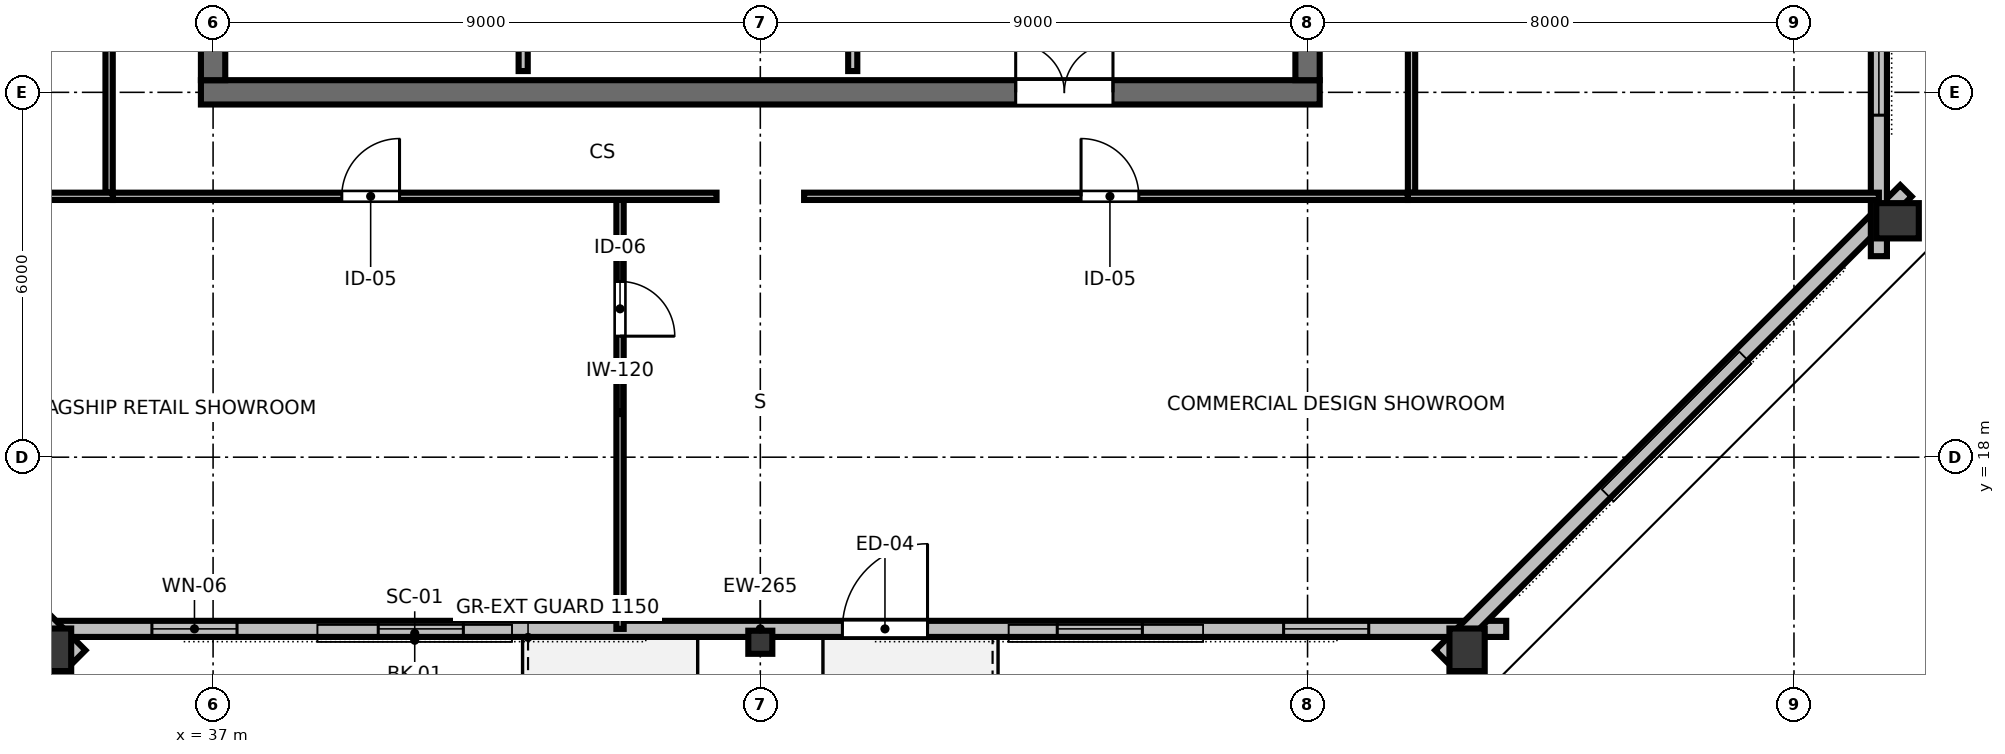
"""IFC4 building model, lengths in metres.
Left out: names, types, materials, properties, quantities, classifications, styles, units other than length and angle.
Written with IfcOpenShell. Run it as: python <this file> out.ifc"""

import sys

from ifc_helpers import new_model, si_unit, direction, frame, frame_2d, origin, origin_2d, place, context, subcontext, project, spatial, rectangle, hollow_rectangle, i_section, extrude, element, fill, save


model = new_model("IFC4")
c1 = context("Model", 3, precision=1e-05, world=origin(), true_north=direction((0.0, 1.0)))
c2 = subcontext(c1, "Body", "Model", "MODEL_VIEW")
j1 = project(units=[si_unit("LENGTHUNIT", "METRE"), si_unit("PLANEANGLEUNIT", "RADIAN")], contexts=[c1])
p1 = place(None, origin())
s1 = spatial("IfcSite", under=j1, at=p1, CompositionType="ELEMENT")
p2 = place(p1, origin())
s2 = spatial("IfcBuilding", under=s1, at=p2, CompositionType="ELEMENT")
p3 = place(p2, frame((0.0, 0.0, 253.8)))
s3 = spatial("IfcBuildingStorey", under=s2, at=p3, CompositionType="ELEMENT", Elevation=253.8)
p4 = place(p3, frame((36.8, 24.0, 0.0), z_axis=(0.0, 0.0, 1.0), x_axis=(1.0, 0.0, 0.0)))
e1 = element("IfcWall", 1, at=p4, inside=s3, PredefinedType="SHEAR", context=c2, shape_type="SweptSolid", body=[
    extrude(rectangle(XDim=18.4, YDim=0.4, at=frame_2d((9.2, 0.0))), origin(), (0.0, 0.0, 1.0), 3.36),
])
p5 = place(p4, frame((13.4, 0.0, 0.0)))
e2 = element("IfcOpeningElement", 2, at=p5, cuts=e1, PredefinedType="OPENING", context=c2, shape_type="SweptSolid", body=[
    extrude(rectangle(XDim=1.6, YDim=2.15, at=frame_2d((0.8, 1.075))), frame((0.0, 0.21, 0.0), z_axis=(0.0, -1.0, 0.0), x_axis=(1.0, 0.0, 0.0)), (0.0, 0.0, 1.0), 0.42),
])
p6 = place(p3, frame((37.0, 24.2, 0.0), z_axis=(0.0, 0.0, 1.0), x_axis=(0.0, 1.0, 0.0)))
e3 = element("IfcWall", 3, at=p6, inside=s3, PredefinedType="SHEAR", context=c2, shape_type="SweptSolid", body=[
    extrude(rectangle(XDim=15.6, YDim=0.4, at=frame_2d((7.8, 0.0))), origin(), (0.0, 0.0, 1.0), 3.36),
])
p7 = place(p6, frame((5.325, 0.0, 0.0)))
e4 = element("IfcOpeningElement", 4, at=p7, cuts=e3, PredefinedType="OPENING", context=c2, shape_type="SweptSolid", body=[
    extrude(rectangle(XDim=1.15, YDim=2.15, at=frame_2d((0.575, 1.075))), frame((0.0, 0.21, 0.0), z_axis=(0.0, -1.0, 0.0), x_axis=(1.0, 0.0, 0.0)), (0.0, 0.0, 1.0), 0.42),
])
p8 = place(p3, frame((55.0, 24.2, 0.0), z_axis=(0.0, 0.0, 1.0), x_axis=(0.0, 1.0, 0.0)))
e5 = element("IfcWall", 5, at=p8, inside=s3, PredefinedType="SHEAR", context=c2, shape_type="SweptSolid", body=[
    extrude(rectangle(XDim=15.6, YDim=0.4, at=frame_2d((7.8, 0.0))), origin(), (0.0, 0.0, 1.0), 3.36),
])
p9 = place(p8, frame((5.325, 0.0, 0.0)))
e6 = element("IfcOpeningElement", 6, at=p9, cuts=e5, PredefinedType="OPENING", context=c2, shape_type="SweptSolid", body=[
    extrude(rectangle(XDim=1.15, YDim=2.15, at=frame_2d((0.575, 1.075))), frame((0.0, 0.21, 0.0), z_axis=(0.0, -1.0, 0.0), x_axis=(1.0, 0.0, 0.0)), (0.0, 0.0, 1.0), 0.42),
])
p10 = place(p3, frame((34.376, 14.833, 0.0), z_axis=(0.0, 0.0, 1.0), x_axis=(1.0, 0.0, 0.0)))
e7 = element("IfcColumn", 7, at=p10, inside=s3, PredefinedType="COLUMN", context=c2, shape_type="SweptSolid", body=[
    extrude(hollow_rectangle(XDim=0.58, YDim=0.7, WallThickness=0.032, at=origin_2d()), origin(), (0.0, 0.0, 1.0), 3.373),
])
p11 = place(p3, frame((46.0, 14.956, 0.0), z_axis=(0.0, 0.0, 1.0), x_axis=(1.0, 0.0, 0.0)))
e8 = element("IfcColumn", 8, at=p11, inside=s3, PredefinedType="COLUMN", context=c2, shape_type="SweptSolid", body=[
    extrude(i_section(OverallWidth=0.395, OverallDepth=0.38, WebThickness=0.019, FlangeThickness=0.03, FilletRadius=0.025, at=origin_2d()), origin(), (0.0, 0.0, 1.0), 3.373),
])
for number, where, z_axis, x_axis in (
    (9, (57.624, 14.833, 0.0), (0.0, 0.0, 1.0), (1.0, 0.0, 0.0)),
    (10, (64.703, 21.888, 0.0), (0.0, 0.0, 1.0), (0.0, 1.0, 0.0)),
):
    element("IfcColumn", number, at=place(p3, frame(where, z_axis=z_axis, x_axis=x_axis)), inside=s3, PredefinedType="COLUMN", context=c2, shape_type="SweptSolid", body=[
        extrude(hollow_rectangle(XDim=0.58, YDim=0.7, WallThickness=0.032, at=origin_2d()), origin(), (0.0, 0.0, 1.0), 3.373),
    ])
p12 = place(p3, frame((33.733, 15.177, 0.0), z_axis=(0.0, 0.0, 1.0), x_axis=(1.0, 0.0, 0.0)))
e11 = element("IfcWall", 11, at=p12, inside=s3, PredefinedType="STANDARD", context=c2, shape_type="SweptSolid", body=[
    extrude(rectangle(XDim=24.535, YDim=0.265, at=frame_2d((12.267, 0.0))), origin(), (0.0, 0.0, 1.0), 2.832),
])
p13 = place(p12, frame((13.617, 0.0, 0.0)))
e12 = element("IfcOpeningElement", 12, at=p13, cuts=e11, PredefinedType="OPENING", context=c2, shape_type="SweptSolid", body=[
    extrude(rectangle(XDim=1.4, YDim=2.15, at=frame_2d((0.7, 1.075))), frame((0.0, 0.142, 0.0), z_axis=(0.0, -1.0, 0.0), x_axis=(1.0, 0.0, 0.0)), (0.0, 0.0, 1.0), 0.285),
])
p14 = place(p12, frame((2.261, 0.0, 0.85)))
e13 = element("IfcOpeningElement", 13, at=p14, cuts=e11, PredefinedType="OPENING", context=c2, shape_type="SweptSolid", body=[
    extrude(rectangle(XDim=1.4, YDim=1.2, at=frame_2d((0.7, 0.6))), frame((0.0, 0.142, 0.0), z_axis=(0.0, -1.0, 0.0), x_axis=(1.0, 0.0, 0.0)), (0.0, 0.0, 1.0), 0.285),
])
p15 = place(p12, frame((5.984, 0.0, 0.85)))
e14 = element("IfcOpeningElement", 14, at=p15, cuts=e11, PredefinedType="OPENING", context=c2, shape_type="SweptSolid", body=[
    extrude(rectangle(XDim=1.4, YDim=1.2, at=frame_2d((0.7, 0.6))), frame((0.0, 0.142, 0.0), z_axis=(0.0, -1.0, 0.0), x_axis=(1.0, 0.0, 0.0)), (0.0, 0.0, 1.0), 0.285),
])
p16 = place(p12, frame((17.151, 0.0, 0.85)))
e15 = element("IfcOpeningElement", 15, at=p16, cuts=e11, PredefinedType="OPENING", context=c2, shape_type="SweptSolid", body=[
    extrude(rectangle(XDim=1.4, YDim=1.2, at=frame_2d((0.7, 0.6))), frame((0.0, 0.142, 0.0), z_axis=(0.0, -1.0, 0.0), x_axis=(1.0, 0.0, 0.0)), (0.0, 0.0, 1.0), 0.285),
])
p17 = place(p12, frame((20.873, 0.0, 0.85)))
e16 = element("IfcOpeningElement", 16, at=p17, cuts=e11, PredefinedType="OPENING", context=c2, shape_type="SweptSolid", body=[
    extrude(rectangle(XDim=1.4, YDim=1.2, at=frame_2d((0.7, 0.6))), frame((0.0, 0.142, 0.0), z_axis=(0.0, -1.0, 0.0), x_axis=(1.0, 0.0, 0.0)), (0.0, 0.0, 1.0), 0.285),
])
p18 = place(p3, frame((57.193, 14.731, 0.0), z_axis=(0.0, 0.0, 1.0), x_axis=(0.707106781187, 0.707106781187, 0.0)))
e17 = element("IfcWall", 17, at=p18, inside=s3, PredefinedType="STANDARD", context=c2, shape_type="SweptSolid", body=[
    extrude(rectangle(XDim=10.816, YDim=0.265, at=frame_2d((5.408, 0.0))), origin(), (0.0, 0.0, 1.0), 2.832),
])
p19 = place(p3, frame((64.396, 21.305, 0.0), z_axis=(0.0, 0.0, 1.0), x_axis=(0.0, 1.0, 0.0)))
e18 = element("IfcWall", 18, at=p19, inside=s3, PredefinedType="STANDARD", context=c2, shape_type="SweptSolid", body=[
    extrude(rectangle(XDim=21.389, YDim=0.265, at=frame_2d((10.695, 0.0))), origin(), (0.0, 0.0, 1.0), 2.832),
])
p20 = place(p19, frame((2.319, 0.0, 0.85)))
e19 = element("IfcOpeningElement", 19, at=p20, cuts=e18, PredefinedType="OPENING", context=c2, shape_type="SweptSolid", body=[
    extrude(rectangle(XDim=1.4, YDim=1.2, at=frame_2d((0.7, 0.6))), frame((0.0, 0.142, 0.0), z_axis=(0.0, -1.0, 0.0), x_axis=(1.0, 0.0, 0.0)), (0.0, 0.0, 1.0), 0.285),
])
p21 = place(p19, frame((6.157, 0.0, 0.85)))
e20 = element("IfcOpeningElement", 20, at=p21, cuts=e18, PredefinedType="OPENING", context=c2, shape_type="SweptSolid", body=[
    extrude(rectangle(XDim=1.4, YDim=1.2, at=frame_2d((0.7, 0.6))), frame((0.0, 0.142, 0.0), z_axis=(0.0, -1.0, 0.0), x_axis=(1.0, 0.0, 0.0)), (0.0, 0.0, 1.0), 0.285),
])
p22 = place(p19, frame((13.832, 0.0, 0.85)))
e21 = element("IfcOpeningElement", 21, at=p22, cuts=e18, PredefinedType="OPENING", context=c2, shape_type="SweptSolid", body=[
    extrude(rectangle(XDim=1.4, YDim=1.2, at=frame_2d((0.7, 0.6))), frame((0.0, 0.142, 0.0), z_axis=(0.0, -1.0, 0.0), x_axis=(1.0, 0.0, 0.0)), (0.0, 0.0, 1.0), 0.285),
])
p23 = place(p19, frame((17.67, 0.0, 0.85)))
e22 = element("IfcOpeningElement", 22, at=p23, cuts=e18, PredefinedType="OPENING", context=c2, shape_type="SweptSolid", body=[
    extrude(rectangle(XDim=1.4, YDim=1.2, at=frame_2d((0.7, 0.6))), frame((0.0, 0.142, 0.0), z_axis=(0.0, -1.0, 0.0), x_axis=(1.0, 0.0, 0.0)), (0.0, 0.0, 1.0), 0.285),
])
p24 = place(p3, frame((27.159, 22.38, 0.0), z_axis=(0.0, 0.0, 1.0), x_axis=(0.707106781187, -0.707106781187, 0.0)))
e23 = element("IfcWall", 23, at=p24, inside=s3, PredefinedType="STANDARD", context=c2, shape_type="SweptSolid", body=[
    extrude(rectangle(XDim=10.816, YDim=0.265, at=frame_2d((5.408, 0.0))), origin(), (0.0, 0.0, 1.0), 2.832),
])
p25 = place(p3, frame((42.1, 24.35, 0.0), z_axis=(0.0, 0.0, 1.0), x_axis=(0.0, 1.0, 0.0)))
e24 = element("IfcWall", 24, at=p25, inside=s3, PredefinedType="PARTITIONING", context=c2, shape_type="SweptSolid", body=[
    extrude(rectangle(XDim=3.9, YDim=0.15, at=frame_2d((1.95, 0.0))), origin(), (0.0, 0.0, 1.0), 3.375),
])
p26 = place(p25, frame((1.5, 0.0, 0.0)))
e25 = element("IfcOpeningElement", 25, at=p26, cuts=e24, PredefinedType="OPENING", context=c2, shape_type="SweptSolid", body=[
    extrude(rectangle(XDim=0.9, YDim=2.15, at=frame_2d((0.45, 1.075))), frame((0.0, 0.085, 0.0), z_axis=(0.0, -1.0, 0.0), x_axis=(1.0, 0.0, 0.0)), (0.0, 0.0, 1.0), 0.17),
])
p27 = place(p3, frame((47.52, 24.35, 0.0), z_axis=(0.0, 0.0, 1.0), x_axis=(0.0, 1.0, 0.0)))
e26 = element("IfcWall", 26, at=p27, inside=s3, PredefinedType="PARTITIONING", context=c2, shape_type="SweptSolid", body=[
    extrude(rectangle(XDim=3.9, YDim=0.15, at=frame_2d((1.95, 0.0))), origin(), (0.0, 0.0, 1.0), 3.375),
])
p28 = place(p27, frame((0.35, 0.0, 0.0)))
e27 = element("IfcOpeningElement", 27, at=p28, cuts=e26, PredefinedType="OPENING", context=c2, shape_type="SweptSolid", body=[
    extrude(rectangle(XDim=0.9, YDim=2.15, at=frame_2d((0.45, 1.075))), frame((0.0, 0.085, 0.0), z_axis=(0.0, -1.0, 0.0), x_axis=(1.0, 0.0, 0.0)), (0.0, 0.0, 1.0), 0.17),
])
p29 = place(p3, frame((43.693, 22.29, 0.0), z_axis=(0.0, 0.0, 1.0), x_axis=(0.0, -1.0, 0.0)))
e28 = element("IfcWall", 28, at=p29, inside=s3, PredefinedType="PARTITIONING", context=c2, shape_type="SweptSolid", body=[
    extrude(rectangle(XDim=7.114, YDim=0.12, at=frame_2d((3.557, 0.0))), origin(), (0.0, 0.0, 1.0), 2.655),
])
p30 = place(p29, frame((1.4, 0.0, 0.0)))
e29 = element("IfcOpeningElement", 29, at=p30, cuts=e28, PredefinedType="OPENING", context=c2, shape_type="SweptSolid", body=[
    extrude(rectangle(XDim=0.9, YDim=2.15, at=frame_2d((0.45, 1.075))), frame((0.0, 0.07, 0.0), z_axis=(0.0, -1.0, 0.0), x_axis=(1.0, 0.0, 0.0)), (0.0, 0.0, 1.0), 0.14),
])
p31 = place(p3, frame((35.35, 22.29, 0.0), z_axis=(0.0, 0.0, 1.0), x_axis=(1.0, 0.0, 0.0)))
e30 = element("IfcWall", 30, at=p31, inside=s3, PredefinedType="PARTITIONING", context=c2, shape_type="SweptSolid", body=[
    extrude(rectangle(XDim=9.93, YDim=0.12, at=frame_2d((4.965, 0.0))), origin(), (0.0, 0.0, 1.0), 2.655),
])
p32 = place(p31, frame((3.767, 0.0, 0.0)))
e31 = element("IfcOpeningElement", 31, at=p32, cuts=e30, PredefinedType="OPENING", context=c2, shape_type="SweptSolid", body=[
    extrude(rectangle(XDim=0.95, YDim=2.15, at=frame_2d((0.475, 1.075))), frame((0.0, 0.07, 0.0), z_axis=(0.0, -1.0, 0.0), x_axis=(1.0, 0.0, 0.0)), (0.0, 0.0, 1.0), 0.14),
])
p33 = place(p3, frame((46.72, 22.29, 0.0), z_axis=(0.0, 0.0, 1.0), x_axis=(1.0, 0.0, 0.0)))
e32 = element("IfcWall", 32, at=p33, inside=s3, PredefinedType="PARTITIONING", context=c2, shape_type="SweptSolid", body=[
    extrude(rectangle(XDim=9.93, YDim=0.12, at=frame_2d((4.965, 0.0))), origin(), (0.0, 0.0, 1.0), 2.655),
])
p34 = place(p33, frame((4.555, 0.0, 0.0)))
e33 = element("IfcOpeningElement", 33, at=p34, cuts=e32, PredefinedType="OPENING", context=c2, shape_type="SweptSolid", body=[
    extrude(rectangle(XDim=0.95, YDim=2.15, at=frame_2d((0.475, 1.075))), frame((0.0, 0.07, 0.0), z_axis=(0.0, -1.0, 0.0), x_axis=(1.0, 0.0, 0.0)), (0.0, 0.0, 1.0), 0.14),
])
p35 = place(p3, frame((35.29, 22.35, 0.0), z_axis=(0.0, 0.0, 1.0), x_axis=(0.0, 1.0, 0.0)))
e34 = element("IfcWall", 34, at=p35, inside=s3, PredefinedType="PARTITIONING", context=c2, shape_type="SweptSolid", body=[
    extrude(rectangle(XDim=19.3, YDim=0.12, at=frame_2d((9.65, 0.0))), origin(), (0.0, 0.0, 1.0), 2.655),
])
p36 = place(p35, frame((3.656, 0.0, 0.0)))
e35 = element("IfcOpeningElement", 35, at=p36, cuts=e34, PredefinedType="OPENING", context=c2, shape_type="SweptSolid", body=[
    extrude(rectangle(XDim=0.95, YDim=2.15, at=frame_2d((0.475, 1.075))), frame((0.0, 0.07, 0.0), z_axis=(0.0, -1.0, 0.0), x_axis=(1.0, 0.0, 0.0)), (0.0, 0.0, 1.0), 0.14),
])
p37 = place(p35, frame((13.106, 0.0, 0.0)))
e36 = element("IfcOpeningElement", 36, at=p37, cuts=e34, PredefinedType="OPENING", context=c2, shape_type="SweptSolid", body=[
    extrude(rectangle(XDim=0.95, YDim=2.15, at=frame_2d((0.475, 1.075))), frame((0.0, 0.07, 0.0), z_axis=(0.0, -1.0, 0.0), x_axis=(1.0, 0.0, 0.0)), (0.0, 0.0, 1.0), 0.14),
])
p38 = place(p3, frame((56.71, 22.35, 0.0), z_axis=(0.0, 0.0, 1.0), x_axis=(0.0, 1.0, 0.0)))
e37 = element("IfcWall", 37, at=p38, inside=s3, PredefinedType="PARTITIONING", context=c2, shape_type="SweptSolid", body=[
    extrude(rectangle(XDim=19.3, YDim=0.12, at=frame_2d((9.65, 0.0))), origin(), (0.0, 0.0, 1.0), 2.655),
])
p39 = place(p38, frame((5.657, 0.0, 0.0)))
e38 = element("IfcOpeningElement", 38, at=p39, cuts=e37, PredefinedType="OPENING", context=c2, shape_type="SweptSolid", body=[
    extrude(rectangle(XDim=0.95, YDim=2.15, at=frame_2d((0.475, 1.075))), frame((0.0, 0.07, 0.0), z_axis=(0.0, -1.0, 0.0), x_axis=(1.0, 0.0, 0.0)), (0.0, 0.0, 1.0), 0.14),
])
p40 = place(p38, frame((15.107, 0.0, 0.0)))
e39 = element("IfcOpeningElement", 39, at=p40, cuts=e37, PredefinedType="OPENING", context=c2, shape_type="SweptSolid", body=[
    extrude(rectangle(XDim=0.95, YDim=2.15, at=frame_2d((0.475, 1.075))), frame((0.0, 0.07, 0.0), z_axis=(0.0, -1.0, 0.0), x_axis=(1.0, 0.0, 0.0)), (0.0, 0.0, 1.0), 0.14),
])
for number, where, z_axis, x_axis in (
    (40, (35.35, 22.29, 0.0), (0.0, 0.0, 1.0), (-1.0, 0.0, 0.0)),
    (41, (56.65, 22.29, 0.0), (0.0, 0.0, 1.0), (1.0, 0.0, 0.0)),
):
    element("IfcWall", number, at=place(p3, frame(where, z_axis=z_axis, x_axis=x_axis)), inside=s3, PredefinedType="PARTITIONING", context=c2, shape_type="SweptSolid", body=[
        extrude(rectangle(XDim=7.747, YDim=0.12, at=frame_2d((3.873, 0.0))), origin(), (0.0, 0.0, 1.0), 2.655),
    ])
p41 = place(p13, origin())
e42 = element("IfcDoor", 42, at=p41, inside=s3, OperationType="SINGLE_SWING_RIGHT", PredefinedType="DOOR", context=c2, shape_type="SweptSolid", body=[
    extrude(rectangle(XDim=1.4, YDim=2.15, at=frame_2d((0.7, 1.075))), frame((0.0, 0.025, 0.0), z_axis=(0.0, -1.0, 0.0), x_axis=(1.0, 0.0, 0.0)), (0.0, 0.0, 1.0), 0.05),
])
fill(e12, e42)
p42 = place(p14, origin())
e43 = element("IfcWindow", 43, at=p42, inside=s3, PartitioningType="SINGLE_PANEL", PredefinedType="WINDOW", context=c2, shape_type="SweptSolid", body=[
    extrude(rectangle(XDim=1.4, YDim=1.2, at=frame_2d((0.7, 0.6))), frame((0.0, 0.03, 0.0), z_axis=(0.0, -1.0, 0.0), x_axis=(1.0, 0.0, 0.0)), (0.0, 0.0, 1.0), 0.06),
])
fill(e13, e43)
p43 = place(p15, origin())
e44 = element("IfcWindow", 44, at=p43, inside=s3, PartitioningType="SINGLE_PANEL", PredefinedType="WINDOW", context=c2, shape_type="SweptSolid", body=[
    extrude(rectangle(XDim=1.4, YDim=1.2, at=frame_2d((0.7, 0.6))), frame((0.0, 0.03, 0.0), z_axis=(0.0, -1.0, 0.0), x_axis=(1.0, 0.0, 0.0)), (0.0, 0.0, 1.0), 0.06),
])
fill(e14, e44)
p44 = place(p16, origin())
e45 = element("IfcWindow", 45, at=p44, inside=s3, PartitioningType="SINGLE_PANEL", PredefinedType="WINDOW", context=c2, shape_type="SweptSolid", body=[
    extrude(rectangle(XDim=1.4, YDim=1.2, at=frame_2d((0.7, 0.6))), frame((0.0, 0.03, 0.0), z_axis=(0.0, -1.0, 0.0), x_axis=(1.0, 0.0, 0.0)), (0.0, 0.0, 1.0), 0.06),
])
fill(e15, e45)
p45 = place(p17, origin())
e46 = element("IfcWindow", 46, at=p45, inside=s3, PartitioningType="SINGLE_PANEL", PredefinedType="WINDOW", context=c2, shape_type="SweptSolid", body=[
    extrude(rectangle(XDim=1.4, YDim=1.2, at=frame_2d((0.7, 0.6))), frame((0.0, 0.03, 0.0), z_axis=(0.0, -1.0, 0.0), x_axis=(1.0, 0.0, 0.0)), (0.0, 0.0, 1.0), 0.06),
])
fill(e16, e46)
p46 = place(p20, origin())
e47 = element("IfcWindow", 47, at=p46, inside=s3, PartitioningType="SINGLE_PANEL", PredefinedType="WINDOW", context=c2, shape_type="SweptSolid", body=[
    extrude(rectangle(XDim=1.4, YDim=1.2, at=frame_2d((0.7, 0.6))), frame((0.0, 0.03, 0.0), z_axis=(0.0, -1.0, 0.0), x_axis=(1.0, 0.0, 0.0)), (0.0, 0.0, 1.0), 0.06),
])
fill(e19, e47)
p47 = place(p5, origin())
e48 = element("IfcDoor", 48, at=p47, inside=s3, OperationType="DOUBLE_DOOR_SINGLE_SWING", PredefinedType="DOOR", context=c2, shape_type="SweptSolid", body=[
    extrude(rectangle(XDim=1.6, YDim=2.15, at=frame_2d((0.8, 1.075))), frame((0.0, 0.025, 0.0), z_axis=(0.0, -1.0, 0.0), x_axis=(1.0, 0.0, 0.0)), (0.0, 0.0, 1.0), 0.05),
])
fill(e2, e48)
p48 = place(p30, origin())
e49 = element("IfcDoor", 49, at=p48, inside=s3, OperationType="SINGLE_SWING_RIGHT", PredefinedType="DOOR", context=c2, shape_type="SweptSolid", body=[
    extrude(rectangle(XDim=0.9, YDim=2.15, at=frame_2d((0.45, 1.075))), frame((0.0, 0.025, 0.0), z_axis=(0.0, -1.0, 0.0), x_axis=(1.0, 0.0, 0.0)), (0.0, 0.0, 1.0), 0.05),
])
fill(e29, e49)
p49 = place(p32, origin())
e50 = element("IfcDoor", 50, at=p49, inside=s3, OperationType="SINGLE_SWING_RIGHT", PredefinedType="DOOR", context=c2, shape_type="SweptSolid", body=[
    extrude(rectangle(XDim=0.95, YDim=2.15, at=frame_2d((0.475, 1.075))), frame((0.0, 0.025, 0.0), z_axis=(0.0, -1.0, 0.0), x_axis=(1.0, 0.0, 0.0)), (0.0, 0.0, 1.0), 0.05),
])
fill(e31, e50)
p50 = place(p34, origin())
e51 = element("IfcDoor", 51, at=p50, inside=s3, OperationType="SINGLE_SWING_LEFT", PredefinedType="DOOR", context=c2, shape_type="SweptSolid", body=[
    extrude(rectangle(XDim=0.95, YDim=2.15, at=frame_2d((0.475, 1.075))), frame((0.0, 0.025, 0.0), z_axis=(0.0, -1.0, 0.0), x_axis=(1.0, 0.0, 0.0)), (0.0, 0.0, 1.0), 0.05),
])
fill(e33, e51)
save(model, sys.argv[1])
